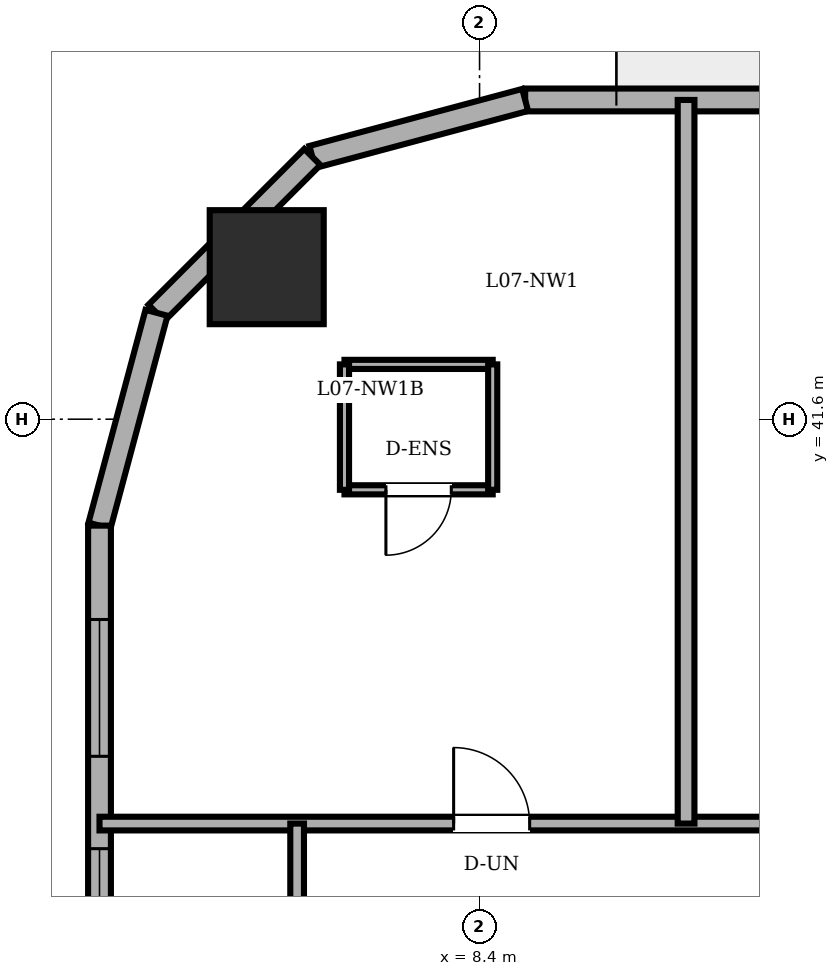
"""IFC4 building model, lengths in metres.
Left out: names, types, materials, properties, quantities, classifications, styles, units other than length and angle.
Written with IfcOpenShell. Run it as: python <this file> out.ifc"""

import sys

from ifc_helpers import new_model, si_unit, direction, frame, frame_2d, origin, origin_2d, place, context, subcontext, project, spatial, rectangle, circle, extrude, element, fill, save


model = new_model("IFC4")
c1 = context("Model", 3, precision=1e-05, world=origin(), true_north=direction((0.0, 1.0)))
c2 = subcontext(c1, "Body", "Model", "MODEL_VIEW")
j1 = project(units=[si_unit("LENGTHUNIT", "METRE"), si_unit("PLANEANGLEUNIT", "RADIAN")], contexts=[c1])
p1 = place(None, origin())
s1 = spatial("IfcSite", under=j1, at=p1, CompositionType="ELEMENT")
p2 = place(p1, origin())
s2 = spatial("IfcBuilding", under=s1, at=p2, CompositionType="ELEMENT")
p3 = place(p2, frame((0.0, 0.0, 28.8)))
s3 = spatial("IfcBuildingStorey", under=s2, at=p3, CompositionType="ELEMENT", Elevation=28.8)
p4 = place(p3, frame((5.6, 43.6, 0.0), z_axis=(0.0, 0.0, 1.0), x_axis=(1.0, 0.0, 0.0)))
e1 = element("IfcColumn", 1, at=p4, inside=s3, PredefinedType="COLUMN", context=c2, shape_type="SweptSolid", body=[
    extrude(circle(Radius=0.75, at=origin_2d()), origin(), (0.0, 0.0, 1.0), 3.6),
])
p5 = place(p3, frame((39.079, 45.8, 0.0), z_axis=(0.0, 0.0, 1.0), x_axis=(-1.0, 0.0, 0.0)))
e2 = element("IfcWall", 2, at=p5, inside=s3, PredefinedType="SOLIDWALL", context=c2, shape_type="SweptSolid", body=[
    extrude(rectangle(XDim=30.079, YDim=0.3, at=frame_2d((15.04, 0.0))), origin(), (0.0, 0.0, 1.0), 3.4),
])
p6 = place(p5, frame((25.279, 0.0, 0.0)))
e3 = element("IfcOpeningElement", 3, at=p6, cuts=e2, PredefinedType="OPENING", context=c2, shape_type="SweptSolid", body=[
    extrude(rectangle(XDim=0.95, YDim=2.2, at=frame_2d((0.475, 1.1))), frame((0.0, 0.16, 0.0), z_axis=(0.0, -1.0, 0.0), x_axis=(1.0, 0.0, 0.0)), (0.0, 0.0, 1.0), 0.32),
])
p7 = place(p5, frame((2.226, 0.0, 0.85)))
e4 = element("IfcOpeningElement", 4, at=p7, cuts=e2, PredefinedType="OPENING", context=c2, shape_type="SweptSolid", body=[
    extrude(rectangle(XDim=1.8, YDim=1.55, at=frame_2d((0.9, 0.775))), frame((0.0, 0.16, 0.0), z_axis=(0.0, -1.0, 0.0), x_axis=(1.0, 0.0, 0.0)), (0.0, 0.0, 1.0), 0.32),
])
p8 = place(p5, frame((5.003, 0.0, 0.85)))
e5 = element("IfcOpeningElement", 5, at=p8, cuts=e2, PredefinedType="OPENING", context=c2, shape_type="SweptSolid", body=[
    extrude(rectangle(XDim=1.8, YDim=1.55, at=frame_2d((0.9, 0.775))), frame((0.0, 0.16, 0.0), z_axis=(0.0, -1.0, 0.0), x_axis=(1.0, 0.0, 0.0)), (0.0, 0.0, 1.0), 0.32),
])
p9 = place(p5, frame((10.179, 0.0, 0.85)))
e6 = element("IfcOpeningElement", 6, at=p9, cuts=e2, PredefinedType="OPENING", context=c2, shape_type="SweptSolid", body=[
    extrude(rectangle(XDim=1.8, YDim=1.55, at=frame_2d((0.9, 0.775))), frame((0.0, 0.16, 0.0), z_axis=(0.0, -1.0, 0.0), x_axis=(1.0, 0.0, 0.0)), (0.0, 0.0, 1.0), 0.32),
])
p10 = place(p5, frame((12.579, 0.0, 0.85)))
e7 = element("IfcOpeningElement", 7, at=p10, cuts=e2, PredefinedType="OPENING", context=c2, shape_type="SweptSolid", body=[
    extrude(rectangle(XDim=1.8, YDim=1.55, at=frame_2d((0.9, 0.775))), frame((0.0, 0.16, 0.0), z_axis=(0.0, -1.0, 0.0), x_axis=(1.0, 0.0, 0.0)), (0.0, 0.0, 1.0), 0.32),
])
p11 = place(p5, frame((19.007, 0.0, 0.85)))
e8 = element("IfcOpeningElement", 8, at=p11, cuts=e2, PredefinedType="OPENING", context=c2, shape_type="SweptSolid", body=[
    extrude(rectangle(XDim=1.8, YDim=1.55, at=frame_2d((0.9, 0.775))), frame((0.0, 0.16, 0.0), z_axis=(0.0, -1.0, 0.0), x_axis=(1.0, 0.0, 0.0)), (0.0, 0.0, 1.0), 0.32),
])
p12 = place(p5, frame((23.034, 0.0, 0.85)))
e9 = element("IfcOpeningElement", 9, at=p12, cuts=e2, PredefinedType="OPENING", context=c2, shape_type="SweptSolid", body=[
    extrude(rectangle(XDim=1.8, YDim=1.55, at=frame_2d((0.9, 0.775))), frame((0.0, 0.16, 0.0), z_axis=(0.0, -1.0, 0.0), x_axis=(1.0, 0.0, 0.0)), (0.0, 0.0, 1.0), 0.32),
])
p13 = place(p3, frame((9.0, 45.8, 0.0), z_axis=(0.0, 0.0, 1.0), x_axis=(-0.96594917914, -0.258731875344, 0.0)))
e10 = element("IfcWall", 10, at=p13, inside=s3, PredefinedType="SOLIDWALL", context=c2, shape_type="SweptSolid", body=[
    extrude(rectangle(XDim=2.899, YDim=0.3, at=frame_2d((1.449, 0.0))), origin(), (0.0, 0.0, 1.0), 3.4),
])
p14 = place(p3, frame((6.2, 45.05, 0.0), z_axis=(0.0, 0.0, 1.0), x_axis=(-0.707106781187, -0.707106781187, 0.0)))
e11 = element("IfcWall", 11, at=p14, inside=s3, PredefinedType="SOLIDWALL", context=c2, shape_type="SweptSolid", body=[
    extrude(rectangle(XDim=2.899, YDim=0.3, at=frame_2d((1.45, 0.0))), origin(), (0.0, 0.0, 1.0), 3.4),
])
p15 = place(p3, frame((4.15, 43.0, 0.0), z_axis=(0.0, 0.0, 1.0), x_axis=(-0.258731875344, -0.96594917914, 0.0)))
e12 = element("IfcWall", 12, at=p15, inside=s3, PredefinedType="SOLIDWALL", context=c2, shape_type="SweptSolid", body=[
    extrude(rectangle(XDim=2.899, YDim=0.3, at=frame_2d((1.449, 0.0))), origin(), (0.0, 0.0, 1.0), 3.4),
])
p16 = place(p3, frame((3.4, 40.2, 0.0), z_axis=(0.0, 0.0, 1.0), x_axis=(0.0, -1.0, 0.0)))
e13 = element("IfcWall", 13, at=p16, inside=s3, PredefinedType="SOLIDWALL", context=c2, shape_type="SweptSolid", body=[
    extrude(rectangle(XDim=32.4, YDim=0.3, at=frame_2d((16.2, 0.0))), origin(), (0.0, 0.0, 1.0), 3.4),
])
p17 = place(p16, frame((1.235, 0.0, 0.85)))
e14 = element("IfcOpeningElement", 14, at=p17, cuts=e13, PredefinedType="OPENING", context=c2, shape_type="SweptSolid", body=[
    extrude(rectangle(XDim=1.8, YDim=1.55, at=frame_2d((0.9, 0.775))), frame((0.0, 0.16, 0.0), z_axis=(0.0, -1.0, 0.0), x_axis=(1.0, 0.0, 0.0)), (0.0, 0.0, 1.0), 0.32),
])
p18 = place(p16, frame((4.25, 0.0, 0.85)))
e15 = element("IfcOpeningElement", 15, at=p18, cuts=e13, PredefinedType="OPENING", context=c2, shape_type="SweptSolid", body=[
    extrude(rectangle(XDim=1.8, YDim=1.55, at=frame_2d((0.9, 0.775))), frame((0.0, 0.16, 0.0), z_axis=(0.0, -1.0, 0.0), x_axis=(1.0, 0.0, 0.0)), (0.0, 0.0, 1.0), 0.32),
])
p19 = place(p16, frame((9.253, 0.0, 0.85)))
e16 = element("IfcOpeningElement", 16, at=p19, cuts=e13, PredefinedType="OPENING", context=c2, shape_type="SweptSolid", body=[
    extrude(rectangle(XDim=1.8, YDim=1.55, at=frame_2d((0.9, 0.775))), frame((0.0, 0.16, 0.0), z_axis=(0.0, -1.0, 0.0), x_axis=(1.0, 0.0, 0.0)), (0.0, 0.0, 1.0), 0.32),
])
p20 = place(p16, frame((13.027, 0.0, 0.85)))
e17 = element("IfcOpeningElement", 17, at=p20, cuts=e13, PredefinedType="OPENING", context=c2, shape_type="SweptSolid", body=[
    extrude(rectangle(XDim=1.8, YDim=1.55, at=frame_2d((0.9, 0.775))), frame((0.0, 0.16, 0.0), z_axis=(0.0, -1.0, 0.0), x_axis=(1.0, 0.0, 0.0)), (0.0, 0.0, 1.0), 0.32),
])
p21 = place(p16, frame((19.573, 0.0, 0.85)))
e18 = element("IfcOpeningElement", 18, at=p21, cuts=e13, PredefinedType="OPENING", context=c2, shape_type="SweptSolid", body=[
    extrude(rectangle(XDim=1.8, YDim=1.55, at=frame_2d((0.9, 0.775))), frame((0.0, 0.16, 0.0), z_axis=(0.0, -1.0, 0.0), x_axis=(1.0, 0.0, 0.0)), (0.0, 0.0, 1.0), 0.32),
])
p22 = place(p16, frame((22.347, 0.0, 0.85)))
e19 = element("IfcOpeningElement", 19, at=p22, cuts=e13, PredefinedType="OPENING", context=c2, shape_type="SweptSolid", body=[
    extrude(rectangle(XDim=1.8, YDim=1.55, at=frame_2d((0.9, 0.775))), frame((0.0, 0.16, 0.0), z_axis=(0.0, -1.0, 0.0), x_axis=(1.0, 0.0, 0.0)), (0.0, 0.0, 1.0), 0.32),
])
p23 = place(p16, frame((26.35, 0.0, 0.85)))
e20 = element("IfcOpeningElement", 20, at=p23, cuts=e13, PredefinedType="OPENING", context=c2, shape_type="SweptSolid", body=[
    extrude(rectangle(XDim=1.8, YDim=1.55, at=frame_2d((0.9, 0.775))), frame((0.0, 0.16, 0.0), z_axis=(0.0, -1.0, 0.0), x_axis=(1.0, 0.0, 0.0)), (0.0, 0.0, 1.0), 0.32),
])
p24 = place(p16, frame((29.365, 0.0, 0.85)))
e21 = element("IfcOpeningElement", 21, at=p24, cuts=e13, PredefinedType="OPENING", context=c2, shape_type="SweptSolid", body=[
    extrude(rectangle(XDim=1.8, YDim=1.55, at=frame_2d((0.9, 0.775))), frame((0.0, 0.16, 0.0), z_axis=(0.0, -1.0, 0.0), x_axis=(1.0, 0.0, 0.0)), (0.0, 0.0, 1.0), 0.32),
])
p25 = place(p3, frame((6.623, 42.321, 0.0), z_axis=(0.0, 0.0, 1.0), x_axis=(1.0, 0.0, 0.0)))
e22 = element("IfcWall", 22, at=p25, inside=s3, PredefinedType="PARTITIONING", context=c2, shape_type="SweptSolid", body=[
    extrude(rectangle(XDim=1.95, YDim=0.12, at=frame_2d((0.975, 0.0))), origin(), (0.0, 0.0, 1.0), 3.4),
])
p26 = place(p3, frame((8.573, 40.671, 0.0), z_axis=(0.0, 0.0, 1.0), x_axis=(-1.0, 0.0, 0.0)))
e23 = element("IfcWall", 23, at=p26, inside=s3, PredefinedType="PARTITIONING", context=c2, shape_type="SweptSolid", body=[
    extrude(rectangle(XDim=1.95, YDim=0.12, at=frame_2d((0.975, 0.0))), origin(), (0.0, 0.0, 1.0), 3.4),
])
p27 = place(p26, frame((0.545, 0.0, 0.0)))
e24 = element("IfcOpeningElement", 24, at=p27, cuts=e23, PredefinedType="OPENING", context=c2, shape_type="SweptSolid", body=[
    extrude(rectangle(XDim=0.86, YDim=2.1, at=frame_2d((0.43, 1.05))), frame((0.0, 0.07, 0.0), z_axis=(0.0, -1.0, 0.0), x_axis=(1.0, 0.0, 0.0)), (0.0, 0.0, 1.0), 0.14),
])
for number, where, z_axis, x_axis in (
    (25, (6.623, 42.321, 0.0), (0.0, 0.0, 1.0), (0.0, -1.0, 0.0)),
    (26, (8.573, 40.671, 0.0), (0.0, 0.0, 1.0), (0.0, 1.0, 0.0)),
):
    element("IfcWall", number, at=place(p3, frame(where, z_axis=z_axis, x_axis=x_axis)), inside=s3, PredefinedType="PARTITIONING", context=c2, shape_type="SweptSolid", body=[
        extrude(rectangle(XDim=1.65, YDim=0.12, at=frame_2d((0.825, 0.0))), origin(), (0.0, 0.0, 1.0), 3.4),
    ])
p28 = place(p3, frame((3.4, 36.28, 0.0), z_axis=(0.0, 0.0, 1.0), x_axis=(1.0, 0.0, 0.0)))
e27 = element("IfcWall", 27, at=p28, inside=s3, PredefinedType="PARTITIONING", context=c2, shape_type="SweptSolid", body=[
    extrude(rectangle(XDim=36.45, YDim=0.18, at=frame_2d((18.225, 0.0))), origin(), (0.0, 0.0, 1.0), 3.4),
])
p29 = place(p28, frame((21.05, 0.0, 0.0)))
e28 = element("IfcOpeningElement", 28, at=p29, cuts=e27, PredefinedType="OPENING", context=c2, shape_type="SweptSolid", body=[
    extrude(rectangle(XDim=0.9, YDim=2.1, at=frame_2d((0.45, 1.05))), frame((0.0, 0.1, 0.0), z_axis=(0.0, -1.0, 0.0), x_axis=(1.0, 0.0, 0.0)), (0.0, 0.0, 1.0), 0.2),
])
p30 = place(p28, frame((24.67, 0.0, 0.0)))
e29 = element("IfcOpeningElement", 29, at=p30, cuts=e27, PredefinedType="OPENING", context=c2, shape_type="SweptSolid", body=[
    extrude(rectangle(XDim=0.86, YDim=2.1, at=frame_2d((0.43, 1.05))), frame((0.0, 0.1, 0.0), z_axis=(0.0, -1.0, 0.0), x_axis=(1.0, 0.0, 0.0)), (0.0, 0.0, 1.0), 0.2),
])
p31 = place(p28, frame((4.659, 0.0, 0.0)))
e30 = element("IfcOpeningElement", 30, at=p31, cuts=e27, PredefinedType="OPENING", context=c2, shape_type="SweptSolid", body=[
    extrude(rectangle(XDim=1.0, YDim=2.15, at=frame_2d((0.5, 1.075))), frame((0.0, 0.1, 0.0), z_axis=(0.0, -1.0, 0.0), x_axis=(1.0, 0.0, 0.0)), (0.0, 0.0, 1.0), 0.2),
])
p32 = place(p28, frame((13.258, 0.0, 0.0)))
e31 = element("IfcOpeningElement", 31, at=p32, cuts=e27, PredefinedType="OPENING", context=c2, shape_type="SweptSolid", body=[
    extrude(rectangle(XDim=1.0, YDim=2.15, at=frame_2d((0.5, 1.075))), frame((0.0, 0.1, 0.0), z_axis=(0.0, -1.0, 0.0), x_axis=(1.0, 0.0, 0.0)), (0.0, 0.0, 1.0), 0.2),
])
p33 = place(p28, frame((30.965, 0.0, 0.0)))
e32 = element("IfcOpeningElement", 32, at=p33, cuts=e27, PredefinedType="OPENING", context=c2, shape_type="SweptSolid", body=[
    extrude(rectangle(XDim=1.0, YDim=2.15, at=frame_2d((0.5, 1.075))), frame((0.0, 0.1, 0.0), z_axis=(0.0, -1.0, 0.0), x_axis=(1.0, 0.0, 0.0)), (0.0, 0.0, 1.0), 0.2),
])
p34 = place(p3, frame((6.0, 33.82, 0.0), z_axis=(0.0, 0.0, 1.0), x_axis=(0.0, 1.0, 0.0)))
e33 = element("IfcWall", 33, at=p34, inside=s3, PredefinedType="PARTITIONING", context=c2, shape_type="SweptSolid", body=[
    extrude(rectangle(XDim=2.46, YDim=0.18, at=frame_2d((1.23, 0.0))), origin(), (0.0, 0.0, 1.0), 3.4),
])
p35 = place(p3, frame((11.117, 36.28, 0.0), z_axis=(0.0, 0.0, 1.0), x_axis=(0.0, 1.0, 0.0)))
e34 = element("IfcWall", 34, at=p35, inside=s3, PredefinedType="PARTITIONING", context=c2, shape_type="SweptSolid", body=[
    extrude(rectangle(XDim=9.52, YDim=0.22, at=frame_2d((4.76, 0.0))), origin(), (0.0, 0.0, 1.0), 3.4),
])
p36 = place(p17, origin())
e35 = element("IfcWindow", 35, at=p36, inside=s3, PartitioningType="DOUBLE_PANEL_VERTICAL", PredefinedType="WINDOW", context=c2, shape_type="SweptSolid", body=[
    extrude(rectangle(XDim=1.8, YDim=1.55, at=frame_2d((0.9, 0.775))), frame((0.0, 0.03, 0.0), z_axis=(0.0, -1.0, 0.0), x_axis=(1.0, 0.0, 0.0)), (0.0, 0.0, 1.0), 0.06),
])
fill(e14, e35)
p37 = place(p18, origin())
e36 = element("IfcWindow", 36, at=p37, inside=s3, PartitioningType="DOUBLE_PANEL_VERTICAL", PredefinedType="WINDOW", context=c2, shape_type="SweptSolid", body=[
    extrude(rectangle(XDim=1.8, YDim=1.55, at=frame_2d((0.9, 0.775))), frame((0.0, 0.03, 0.0), z_axis=(0.0, -1.0, 0.0), x_axis=(1.0, 0.0, 0.0)), (0.0, 0.0, 1.0), 0.06),
])
fill(e15, e36)
p38 = place(p27, origin())
e37 = element("IfcDoor", 37, at=p38, inside=s3, OperationType="SINGLE_SWING_RIGHT", PredefinedType="DOOR", context=c2, shape_type="SweptSolid", body=[
    extrude(rectangle(XDim=0.86, YDim=2.1, at=frame_2d((0.43, 1.05))), frame((0.0, 0.025, 0.0), z_axis=(0.0, -1.0, 0.0), x_axis=(1.0, 0.0, 0.0)), (0.0, 0.0, 1.0), 0.05),
])
fill(e24, e37)
p39 = place(p31, origin())
e38 = element("IfcDoor", 38, at=p39, inside=s3, OperationType="SINGLE_SWING_LEFT", PredefinedType="DOOR", context=c2, shape_type="SweptSolid", body=[
    extrude(rectangle(XDim=1.0, YDim=2.15, at=frame_2d((0.5, 1.075))), frame((0.0, 0.025, 0.0), z_axis=(0.0, -1.0, 0.0), x_axis=(1.0, 0.0, 0.0)), (0.0, 0.0, 1.0), 0.05),
])
fill(e30, e38)
save(model, sys.argv[1])
